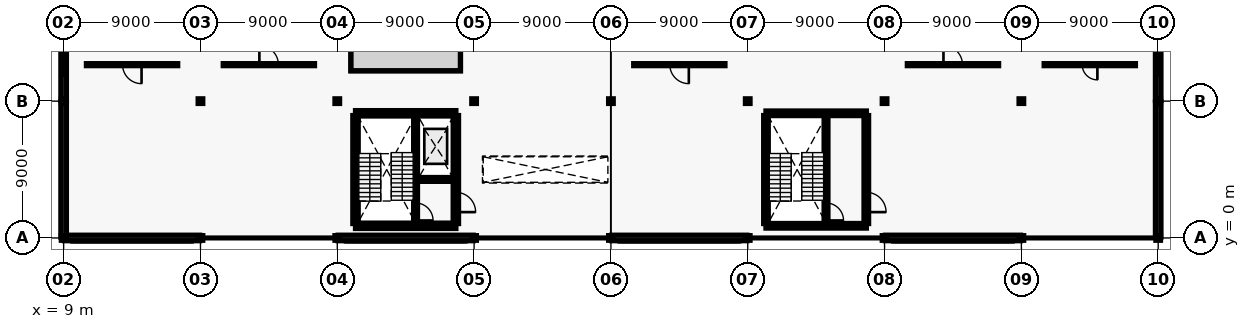
"""IFC4 building model, lengths in metres.
Left out: names, types, materials, properties, quantities, classifications, styles, units other than length and angle.
Written with IfcOpenShell. Run it as: python <this file> out.ifc"""

import sys

from ifc_helpers import new_model, si_unit, direction, frame, frame_2d, origin, origin_2d, place, context, subcontext, project, spatial, rectangle, i_section, extrude, element, fill, save


model = new_model("IFC4")
c1 = context("Model", 3, precision=1e-05, world=origin(), true_north=direction((0.0, 1.0)))
c2 = subcontext(c1, "Body", "Model", "MODEL_VIEW")
j1 = project(units=[si_unit("LENGTHUNIT", "METRE"), si_unit("PLANEANGLEUNIT", "RADIAN")], contexts=[c1])
p1 = place(None, origin())
s1 = spatial("IfcSite", under=j1, at=p1, CompositionType="ELEMENT")
p2 = place(p1, origin())
s2 = spatial("IfcBuilding", under=s1, at=p2, CompositionType="ELEMENT")
p3 = place(p2, frame((0.0, 0.0, 9.6)))
s3 = spatial("IfcBuildingStorey", under=s2, at=p3, CompositionType="ELEMENT", Elevation=9.6)
for number, where, z_axis, x_axis in (
    (1, (9.0, 0.0, 0.0), (0.0, 0.0, 1.0), (1.0, 0.0, 0.0)),
    (2, (9.0, 9.0, 0.0), (0.0, 0.0, 1.0), (1.0, 0.0, 0.0)),
    (3, (18.0, 0.0, 0.0), (0.0, 0.0, 1.0), (1.0, 0.0, 0.0)),
    (4, (18.0, 9.0, 0.0), (0.0, 0.0, 1.0), (1.0, 0.0, 0.0)),
    (5, (27.0, 0.0, 0.0), (0.0, 0.0, 1.0), (1.0, 0.0, 0.0)),
    (6, (27.0, 9.0, 0.0), (0.0, 0.0, 1.0), (1.0, 0.0, 0.0)),
    (7, (36.0, 0.0, 0.0), (0.0, 0.0, 1.0), (1.0, 0.0, 0.0)),
    (8, (36.0, 9.0, 0.0), (0.0, 0.0, 1.0), (1.0, 0.0, 0.0)),
    (9, (45.0, 0.0, 0.0), (0.0, 0.0, 1.0), (1.0, 0.0, 0.0)),
    (10, (45.0, 9.0, 0.0), (0.0, 0.0, 1.0), (1.0, 0.0, 0.0)),
    (11, (54.0, 0.0, 0.0), (0.0, 0.0, 1.0), (1.0, 0.0, 0.0)),
    (12, (54.0, 9.0, 0.0), (0.0, 0.0, 1.0), (1.0, 0.0, 0.0)),
    (13, (63.0, 0.0, 0.0), (0.0, 0.0, 1.0), (1.0, 0.0, 0.0)),
    (14, (63.0, 9.0, 0.0), (0.0, 0.0, 1.0), (1.0, 0.0, 0.0)),
    (15, (72.0, 0.0, 0.0), (0.0, 0.0, 1.0), (1.0, 0.0, 0.0)),
    (16, (72.0, 9.0, 0.0), (0.0, 0.0, 1.0), (1.0, 0.0, 0.0)),
    (17, (81.0, 0.0, 0.0), (0.0, 0.0, 1.0), (1.0, 0.0, 0.0)),
    (18, (81.0, 9.0, 0.0), (0.0, 0.0, 1.0), (1.0, 0.0, 0.0)),
):
    element("IfcColumn", number, at=place(p3, frame(where, z_axis=z_axis, x_axis=x_axis)), inside=s3, PredefinedType="COLUMN", context=c2, shape_type="SweptSolid", body=[
        extrude(i_section(OverallWidth=0.3, OverallDepth=0.3, WebThickness=0.011, FlangeThickness=0.019, FilletRadius=0.027, at=origin_2d()), origin(), (0.0, 0.0, 1.0), 3.9),
    ])
for number, where, z_axis, x_axis in (
    (19, (9.06, 0.0, 0.0), (0.0, 0.0, 1.0), (1.0, 0.0, 0.0)),
    (20, (27.06, 0.0, 0.0), (0.0, 0.0, 1.0), (1.0, 0.0, 0.0)),
    (21, (45.06, 0.0, 0.0), (0.0, 0.0, 1.0), (1.0, 0.0, 0.0)),
    (22, (63.06, 0.0, 0.0), (0.0, 0.0, 1.0), (1.0, 0.0, 0.0)),
    (23, (9.0, 0.06, 0.0), (0.0, 0.0, 1.0), (0.0, 1.0, 0.0)),
):
    element("IfcWall", number, at=place(p3, frame(where, z_axis=z_axis, x_axis=x_axis)), inside=s3, PredefinedType="SOLIDWALL", context=c2, shape_type="SweptSolid", body=[
        extrude(rectangle(XDim=8.88, YDim=0.36, at=frame_2d((4.44, 0.0))), origin(), (0.0, 0.0, 1.0), 3.25),
    ])
p4 = place(p3, frame((9.0, 9.06, 0.0), z_axis=(0.0, 0.0, 1.0), x_axis=(0.0, 1.0, 0.0)))
e24 = element("IfcWall", 24, at=p4, inside=s3, PredefinedType="SOLIDWALL", context=c2, shape_type="SweptSolid", body=[
    extrude(rectangle(XDim=8.88, YDim=0.36, at=frame_2d((4.44, 0.0))), origin(), (0.0, 0.0, 1.0), 3.25),
])
p5 = place(p4, frame((1.611, 0.0, 0.9)))
e25 = element("IfcOpeningElement", 25, at=p5, cuts=e24, PredefinedType="OPENING", context=c2, shape_type="SweptSolid", body=[
    extrude(rectangle(XDim=1.75, YDim=2.25, at=frame_2d((0.875, 1.125))), frame((0.0, 0.19, 0.0), z_axis=(0.0, -1.0, 0.0), x_axis=(1.0, 0.0, 0.0)), (0.0, 0.0, 1.0), 0.38),
])
p6 = place(p4, frame((5.519, 0.0, 0.9)))
e26 = element("IfcOpeningElement", 26, at=p6, cuts=e24, PredefinedType="OPENING", context=c2, shape_type="SweptSolid", body=[
    extrude(rectangle(XDim=1.75, YDim=2.25, at=frame_2d((0.875, 1.125))), frame((0.0, 0.19, 0.0), z_axis=(0.0, -1.0, 0.0), x_axis=(1.0, 0.0, 0.0)), (0.0, 0.0, 1.0), 0.38),
])
p7 = place(p3, frame((81.0, 0.06, 0.0), z_axis=(0.0, 0.0, 1.0), x_axis=(0.0, 1.0, 0.0)))
e27 = element("IfcWall", 27, at=p7, inside=s3, PredefinedType="SOLIDWALL", context=c2, shape_type="SweptSolid", body=[
    extrude(rectangle(XDim=8.88, YDim=0.36, at=frame_2d((4.44, 0.0))), origin(), (0.0, 0.0, 1.0), 3.25),
])
p8 = place(p3, frame((81.0, 9.06, 0.0), z_axis=(0.0, 0.0, 1.0), x_axis=(0.0, 1.0, 0.0)))
e28 = element("IfcWall", 28, at=p8, inside=s3, PredefinedType="SOLIDWALL", context=c2, shape_type="SweptSolid", body=[
    extrude(rectangle(XDim=8.88, YDim=0.36, at=frame_2d((4.44, 0.0))), origin(), (0.0, 0.0, 1.0), 3.25),
])
p9 = place(p8, frame((1.611, 0.0, 0.9)))
e29 = element("IfcOpeningElement", 29, at=p9, cuts=e28, PredefinedType="OPENING", context=c2, shape_type="SweptSolid", body=[
    extrude(rectangle(XDim=1.75, YDim=2.25, at=frame_2d((0.875, 1.125))), frame((0.0, 0.19, 0.0), z_axis=(0.0, -1.0, 0.0), x_axis=(1.0, 0.0, 0.0)), (0.0, 0.0, 1.0), 0.38),
])
p10 = place(p8, frame((5.519, 0.0, 0.9)))
e30 = element("IfcOpeningElement", 30, at=p10, cuts=e28, PredefinedType="OPENING", context=c2, shape_type="SweptSolid", body=[
    extrude(rectangle(XDim=1.75, YDim=2.25, at=frame_2d((0.875, 1.125))), frame((0.0, 0.19, 0.0), z_axis=(0.0, -1.0, 0.0), x_axis=(1.0, 0.0, 0.0)), (0.0, 0.0, 1.0), 0.38),
])
for number, where, z_axis, x_axis in (
    (31, (28.2, 0.8, 0.0), (0.0, 0.0, 1.0), (1.0, 0.0, 0.0)),
    (32, (28.2, 8.2, 0.0), (0.0, 0.0, 1.0), (1.0, 0.0, 0.0)),
):
    element("IfcWall", number, at=place(p3, frame(where, z_axis=z_axis, x_axis=x_axis)), inside=s3, PredefinedType="SHEAR", context=c2, shape_type="SweptSolid", body=[
        extrude(rectangle(XDim=6.6, YDim=0.35, at=frame_2d((3.3, 0.0))), origin(), (0.0, 0.0, 1.0), 3.9),
    ])
p11 = place(p3, frame((28.2, 0.95, 0.0), z_axis=(0.0, 0.0, 1.0), x_axis=(0.0, 1.0, 0.0)))
e33 = element("IfcWall", 33, at=p11, inside=s3, PredefinedType="SHEAR", context=c2, shape_type="SweptSolid", body=[
    extrude(rectangle(XDim=7.1, YDim=0.35, at=frame_2d((3.55, 0.0))), origin(), (0.0, 0.0, 1.0), 3.9),
])
p12 = place(p3, frame((34.8, 0.95, 0.0), z_axis=(0.0, 0.0, 1.0), x_axis=(0.0, 1.0, 0.0)))
e34 = element("IfcWall", 34, at=p12, inside=s3, PredefinedType="SHEAR", context=c2, shape_type="SweptSolid", body=[
    extrude(rectangle(XDim=7.1, YDim=0.35, at=frame_2d((3.55, 0.0))), origin(), (0.0, 0.0, 1.0), 3.9),
])
p13 = place(p12, frame((0.75, 0.0, 0.0)))
e35 = element("IfcOpeningElement", 35, at=p13, cuts=e34, PredefinedType="OPENING", context=c2, shape_type="SweptSolid", body=[
    extrude(rectangle(XDim=1.3, YDim=2.15, at=frame_2d((0.65, 1.075))), frame((0.0, 0.185, 0.0), z_axis=(0.0, -1.0, 0.0), x_axis=(1.0, 0.0, 0.0)), (0.0, 0.0, 1.0), 0.37),
])
p14 = place(p3, frame((32.15, 0.95, 0.0), z_axis=(0.0, 0.0, 1.0), x_axis=(0.0, 1.0, 0.0)))
e36 = element("IfcWall", 36, at=p14, inside=s3, PredefinedType="SHEAR", context=c2, shape_type="SweptSolid", body=[
    extrude(rectangle(XDim=7.1, YDim=0.25, at=frame_2d((3.55, 0.0))), origin(), (0.0, 0.0, 1.0), 3.9),
])
p15 = place(p14, frame((0.2, 0.0, 0.0)))
e37 = element("IfcOpeningElement", 37, at=p15, cuts=e36, PredefinedType="OPENING", context=c2, shape_type="SweptSolid", body=[
    extrude(rectangle(XDim=1.15, YDim=2.15, at=frame_2d((0.575, 1.075))), frame((0.0, 0.135, 0.0), z_axis=(0.0, -1.0, 0.0), x_axis=(1.0, 0.0, 0.0)), (0.0, 0.0, 1.0), 0.27),
])
p16 = place(p3, frame((32.27, 3.85, 0.0), z_axis=(0.0, 0.0, 1.0), x_axis=(1.0, 0.0, 0.0)))
e38 = element("IfcWall", 38, at=p16, inside=s3, PredefinedType="SHEAR", context=c2, shape_type="SweptSolid", body=[
    extrude(rectangle(XDim=2.38, YDim=0.25, at=frame_2d((1.19, 0.0))), origin(), (0.0, 0.0, 1.0), 3.9),
])
p17 = place(p16, frame((0.64, 0.0, 0.0)))
e39 = element("IfcOpeningElement", 39, at=p17, cuts=e38, PredefinedType="OPENING", context=c2, shape_type="SweptSolid", body=[
    extrude(rectangle(XDim=1.1, YDim=2.15, at=frame_2d((0.55, 1.075))), frame((0.0, 0.135, 0.0), z_axis=(0.0, -1.0, 0.0), x_axis=(1.0, 0.0, 0.0)), (0.0, 0.0, 1.0), 0.27),
])
for number, where, z_axis, x_axis in (
    (40, (55.2, 0.8, 0.0), (0.0, 0.0, 1.0), (1.0, 0.0, 0.0)),
    (41, (55.2, 8.2, 0.0), (0.0, 0.0, 1.0), (1.0, 0.0, 0.0)),
):
    element("IfcWall", number, at=place(p3, frame(where, z_axis=z_axis, x_axis=x_axis)), inside=s3, PredefinedType="SHEAR", context=c2, shape_type="SweptSolid", body=[
        extrude(rectangle(XDim=6.6, YDim=0.3, at=frame_2d((3.3, 0.0))), origin(), (0.0, 0.0, 1.0), 3.9),
    ])
p18 = place(p3, frame((55.2, 0.95, 0.0), z_axis=(0.0, 0.0, 1.0), x_axis=(0.0, 1.0, 0.0)))
e42 = element("IfcWall", 42, at=p18, inside=s3, PredefinedType="SHEAR", context=c2, shape_type="SweptSolid", body=[
    extrude(rectangle(XDim=7.1, YDim=0.3, at=frame_2d((3.55, 0.0))), origin(), (0.0, 0.0, 1.0), 3.9),
])
p19 = place(p3, frame((61.8, 0.95, 0.0), z_axis=(0.0, 0.0, 1.0), x_axis=(0.0, 1.0, 0.0)))
e43 = element("IfcWall", 43, at=p19, inside=s3, PredefinedType="SHEAR", context=c2, shape_type="SweptSolid", body=[
    extrude(rectangle(XDim=7.1, YDim=0.3, at=frame_2d((3.55, 0.0))), origin(), (0.0, 0.0, 1.0), 3.9),
])
p20 = place(p19, frame((0.75, 0.0, 0.0)))
e44 = element("IfcOpeningElement", 44, at=p20, cuts=e43, PredefinedType="OPENING", context=c2, shape_type="SweptSolid", body=[
    extrude(rectangle(XDim=1.3, YDim=2.15, at=frame_2d((0.65, 1.075))), frame((0.0, 0.16, 0.0), z_axis=(0.0, -1.0, 0.0), x_axis=(1.0, 0.0, 0.0)), (0.0, 0.0, 1.0), 0.32),
])
p21 = place(p3, frame((59.15, 0.95, 0.0), z_axis=(0.0, 0.0, 1.0), x_axis=(0.0, 1.0, 0.0)))
e45 = element("IfcWall", 45, at=p21, inside=s3, PredefinedType="SHEAR", context=c2, shape_type="SweptSolid", body=[
    extrude(rectangle(XDim=7.1, YDim=0.25, at=frame_2d((3.55, 0.0))), origin(), (0.0, 0.0, 1.0), 3.9),
])
p22 = place(p21, frame((0.2, 0.0, 0.0)))
e46 = element("IfcOpeningElement", 46, at=p22, cuts=e45, PredefinedType="OPENING", context=c2, shape_type="SweptSolid", body=[
    extrude(rectangle(XDim=1.15, YDim=2.15, at=frame_2d((0.575, 1.075))), frame((0.0, 0.135, 0.0), z_axis=(0.0, -1.0, 0.0), x_axis=(1.0, 0.0, 0.0)), (0.0, 0.0, 1.0), 0.27),
])
p23 = place(p3, frame((10.5, 11.4, 0.0), z_axis=(0.0, 0.0, 1.0), x_axis=(1.0, 0.0, 0.0)))
e47 = element("IfcWall", 47, at=p23, inside=s3, PredefinedType="PARTITIONING", context=c2, shape_type="SweptSolid", body=[
    extrude(rectangle(XDim=6.0, YDim=0.13, at=frame_2d((3.0, 0.0))), origin(), (0.0, 0.0, 1.0), 2.9),
])
p24 = place(p23, frame((2.375, 0.0, 0.0)))
e48 = element("IfcOpeningElement", 48, at=p24, cuts=e47, PredefinedType="OPENING", context=c2, shape_type="SweptSolid", body=[
    extrude(rectangle(XDim=1.25, YDim=2.15, at=frame_2d((0.625, 1.075))), frame((0.0, 0.075, 0.0), z_axis=(0.0, -1.0, 0.0), x_axis=(1.0, 0.0, 0.0)), (0.0, 0.0, 1.0), 0.15),
])
p25 = place(p3, frame((19.5, 11.4, 0.0), z_axis=(0.0, 0.0, 1.0), x_axis=(1.0, 0.0, 0.0)))
e49 = element("IfcWall", 49, at=p25, inside=s3, PredefinedType="PARTITIONING", context=c2, shape_type="SweptSolid", body=[
    extrude(rectangle(XDim=6.0, YDim=0.13, at=frame_2d((3.0, 0.0))), origin(), (0.0, 0.0, 1.0), 2.9),
])
p26 = place(p25, frame((2.375, 0.0, 0.0)))
e50 = element("IfcOpeningElement", 50, at=p26, cuts=e49, PredefinedType="OPENING", context=c2, shape_type="SweptSolid", body=[
    extrude(rectangle(XDim=1.25, YDim=2.15, at=frame_2d((0.625, 1.075))), frame((0.0, 0.075, 0.0), z_axis=(0.0, -1.0, 0.0), x_axis=(1.0, 0.0, 0.0)), (0.0, 0.0, 1.0), 0.15),
])
p27 = place(p3, frame((46.5, 11.4, 0.0), z_axis=(0.0, 0.0, 1.0), x_axis=(1.0, 0.0, 0.0)))
e51 = element("IfcWall", 51, at=p27, inside=s3, PredefinedType="PARTITIONING", context=c2, shape_type="SweptSolid", body=[
    extrude(rectangle(XDim=6.0, YDim=0.13, at=frame_2d((3.0, 0.0))), origin(), (0.0, 0.0, 1.0), 2.9),
])
p28 = place(p27, frame((2.375, 0.0, 0.0)))
e52 = element("IfcOpeningElement", 52, at=p28, cuts=e51, PredefinedType="OPENING", context=c2, shape_type="SweptSolid", body=[
    extrude(rectangle(XDim=1.25, YDim=2.15, at=frame_2d((0.625, 1.075))), frame((0.0, 0.075, 0.0), z_axis=(0.0, -1.0, 0.0), x_axis=(1.0, 0.0, 0.0)), (0.0, 0.0, 1.0), 0.15),
])
p29 = place(p3, frame((64.5, 11.4, 0.0), z_axis=(0.0, 0.0, 1.0), x_axis=(1.0, 0.0, 0.0)))
e53 = element("IfcWall", 53, at=p29, inside=s3, PredefinedType="PARTITIONING", context=c2, shape_type="SweptSolid", body=[
    extrude(rectangle(XDim=6.0, YDim=0.13, at=frame_2d((3.0, 0.0))), origin(), (0.0, 0.0, 1.0), 2.9),
])
p30 = place(p29, frame((2.375, 0.0, 0.0)))
e54 = element("IfcOpeningElement", 54, at=p30, cuts=e53, PredefinedType="OPENING", context=c2, shape_type="SweptSolid", body=[
    extrude(rectangle(XDim=1.25, YDim=2.15, at=frame_2d((0.625, 1.075))), frame((0.0, 0.075, 0.0), z_axis=(0.0, -1.0, 0.0), x_axis=(1.0, 0.0, 0.0)), (0.0, 0.0, 1.0), 0.15),
])
p31 = place(p3, frame((73.5, 11.4, 0.0), z_axis=(0.0, 0.0, 1.0), x_axis=(1.0, 0.0, 0.0)))
e55 = element("IfcWall", 55, at=p31, inside=s3, PredefinedType="PARTITIONING", context=c2, shape_type="SweptSolid", body=[
    extrude(rectangle(XDim=6.0, YDim=0.13, at=frame_2d((3.0, 0.0))), origin(), (0.0, 0.0, 1.0), 2.9),
])
p32 = place(p31, frame((2.5, 0.0, 0.0)))
e56 = element("IfcOpeningElement", 56, at=p32, cuts=e55, PredefinedType="OPENING", context=c2, shape_type="SweptSolid", body=[
    extrude(rectangle(XDim=1.0, YDim=2.1, at=frame_2d((0.5, 1.05))), frame((0.0, 0.075, 0.0), z_axis=(0.0, -1.0, 0.0), x_axis=(1.0, 0.0, 0.0)), (0.0, 0.0, 1.0), 0.15),
])
p33 = place(p5, origin())
e57 = element("IfcWindow", 57, at=p33, inside=s3, PartitioningType="SINGLE_PANEL", PredefinedType="WINDOW", context=c2, shape_type="SweptSolid", body=[
    extrude(rectangle(XDim=1.75, YDim=2.25, at=frame_2d((0.875, 1.125))), frame((0.0, 0.03, 0.0), z_axis=(0.0, -1.0, 0.0), x_axis=(1.0, 0.0, 0.0)), (0.0, 0.0, 1.0), 0.06),
])
fill(e25, e57)
p34 = place(p9, origin())
e58 = element("IfcWindow", 58, at=p34, inside=s3, PartitioningType="SINGLE_PANEL", PredefinedType="WINDOW", context=c2, shape_type="SweptSolid", body=[
    extrude(rectangle(XDim=1.75, YDim=2.25, at=frame_2d((0.875, 1.125))), frame((0.0, 0.03, 0.0), z_axis=(0.0, -1.0, 0.0), x_axis=(1.0, 0.0, 0.0)), (0.0, 0.0, 1.0), 0.06),
])
fill(e29, e58)
p35 = place(p13, frame((1.3, 0.0, 0.0), z_axis=(0.0, 0.0, 1.0), x_axis=(-1.0, 0.0, 0.0)))
e59 = element("IfcDoor", 59, at=p35, inside=s3, OperationType="DOUBLE_DOOR_SINGLE_SWING", PredefinedType="DOOR", context=c2, shape_type="SweptSolid", body=[
    extrude(rectangle(XDim=1.3, YDim=2.15, at=frame_2d((0.65, 1.075))), frame((0.0, 0.025, 0.0), z_axis=(0.0, -1.0, 0.0), x_axis=(1.0, 0.0, 0.0)), (0.0, 0.0, 1.0), 0.05),
])
fill(e35, e59)
p36 = place(p15, frame((1.15, 0.0, 0.0), z_axis=(0.0, 0.0, 1.0), x_axis=(-1.0, 0.0, 0.0)))
e60 = element("IfcDoor", 60, at=p36, inside=s3, OperationType="SINGLE_SWING_LEFT", PredefinedType="DOOR", context=c2, shape_type="SweptSolid", body=[
    extrude(rectangle(XDim=1.15, YDim=2.15, at=frame_2d((0.575, 1.075))), frame((0.0, 0.025, 0.0), z_axis=(0.0, -1.0, 0.0), x_axis=(1.0, 0.0, 0.0)), (0.0, 0.0, 1.0), 0.05),
])
fill(e37, e60)
p37 = place(p17, origin())
e61 = element("IfcDoor", 61, at=p37, inside=s3, OperationType="SLIDING_TO_LEFT", PredefinedType="DOOR", context=c2, shape_type="SweptSolid", body=[
    extrude(rectangle(XDim=1.1, YDim=2.15, at=frame_2d((0.55, 1.075))), frame((0.0, 0.025, 0.0), z_axis=(0.0, -1.0, 0.0), x_axis=(1.0, 0.0, 0.0)), (0.0, 0.0, 1.0), 0.05),
])
fill(e39, e61)
p38 = place(p20, frame((1.3, 0.0, 0.0), z_axis=(0.0, 0.0, 1.0), x_axis=(-1.0, 0.0, 0.0)))
e62 = element("IfcDoor", 62, at=p38, inside=s3, OperationType="DOUBLE_DOOR_SINGLE_SWING", PredefinedType="DOOR", context=c2, shape_type="SweptSolid", body=[
    extrude(rectangle(XDim=1.3, YDim=2.15, at=frame_2d((0.65, 1.075))), frame((0.0, 0.025, 0.0), z_axis=(0.0, -1.0, 0.0), x_axis=(1.0, 0.0, 0.0)), (0.0, 0.0, 1.0), 0.05),
])
fill(e44, e62)
p39 = place(p22, frame((1.15, 0.0, 0.0), z_axis=(0.0, 0.0, 1.0), x_axis=(-1.0, 0.0, 0.0)))
e63 = element("IfcDoor", 63, at=p39, inside=s3, OperationType="SINGLE_SWING_LEFT", PredefinedType="DOOR", context=c2, shape_type="SweptSolid", body=[
    extrude(rectangle(XDim=1.15, YDim=2.15, at=frame_2d((0.575, 1.075))), frame((0.0, 0.025, 0.0), z_axis=(0.0, -1.0, 0.0), x_axis=(1.0, 0.0, 0.0)), (0.0, 0.0, 1.0), 0.05),
])
fill(e46, e63)
p40 = place(p24, origin())
e64 = element("IfcDoor", 64, at=p40, inside=s3, OperationType="SINGLE_SWING_RIGHT", PredefinedType="DOOR", context=c2, shape_type="SweptSolid", body=[
    extrude(rectangle(XDim=1.25, YDim=2.15, at=frame_2d((0.625, 1.075))), frame((0.0, 0.025, 0.0), z_axis=(0.0, -1.0, 0.0), x_axis=(1.0, 0.0, 0.0)), (0.0, 0.0, 1.0), 0.05),
])
fill(e48, e64)
p41 = place(p26, origin())
e65 = element("IfcDoor", 65, at=p41, inside=s3, OperationType="SINGLE_SWING_LEFT", PredefinedType="DOOR", context=c2, shape_type="SweptSolid", body=[
    extrude(rectangle(XDim=1.25, YDim=2.15, at=frame_2d((0.625, 1.075))), frame((0.0, 0.025, 0.0), z_axis=(0.0, -1.0, 0.0), x_axis=(1.0, 0.0, 0.0)), (0.0, 0.0, 1.0), 0.05),
])
fill(e50, e65)
p42 = place(p28, origin())
e66 = element("IfcDoor", 66, at=p42, inside=s3, OperationType="SINGLE_SWING_RIGHT", PredefinedType="DOOR", context=c2, shape_type="SweptSolid", body=[
    extrude(rectangle(XDim=1.25, YDim=2.15, at=frame_2d((0.625, 1.075))), frame((0.0, 0.025, 0.0), z_axis=(0.0, -1.0, 0.0), x_axis=(1.0, 0.0, 0.0)), (0.0, 0.0, 1.0), 0.05),
])
fill(e52, e66)
p43 = place(p30, origin())
e67 = element("IfcDoor", 67, at=p43, inside=s3, OperationType="SINGLE_SWING_LEFT", PredefinedType="DOOR", context=c2, shape_type="SweptSolid", body=[
    extrude(rectangle(XDim=1.25, YDim=2.15, at=frame_2d((0.625, 1.075))), frame((0.0, 0.025, 0.0), z_axis=(0.0, -1.0, 0.0), x_axis=(1.0, 0.0, 0.0)), (0.0, 0.0, 1.0), 0.05),
])
fill(e54, e67)
p44 = place(p32, origin())
e68 = element("IfcDoor", 68, at=p44, inside=s3, OperationType="SINGLE_SWING_RIGHT", PredefinedType="DOOR", context=c2, shape_type="SweptSolid", body=[
    extrude(rectangle(XDim=1.0, YDim=2.1, at=frame_2d((0.5, 1.05))), frame((0.0, 0.025, 0.0), z_axis=(0.0, -1.0, 0.0), x_axis=(1.0, 0.0, 0.0)), (0.0, 0.0, 1.0), 0.05),
])
fill(e56, e68)
save(model, sys.argv[1])
